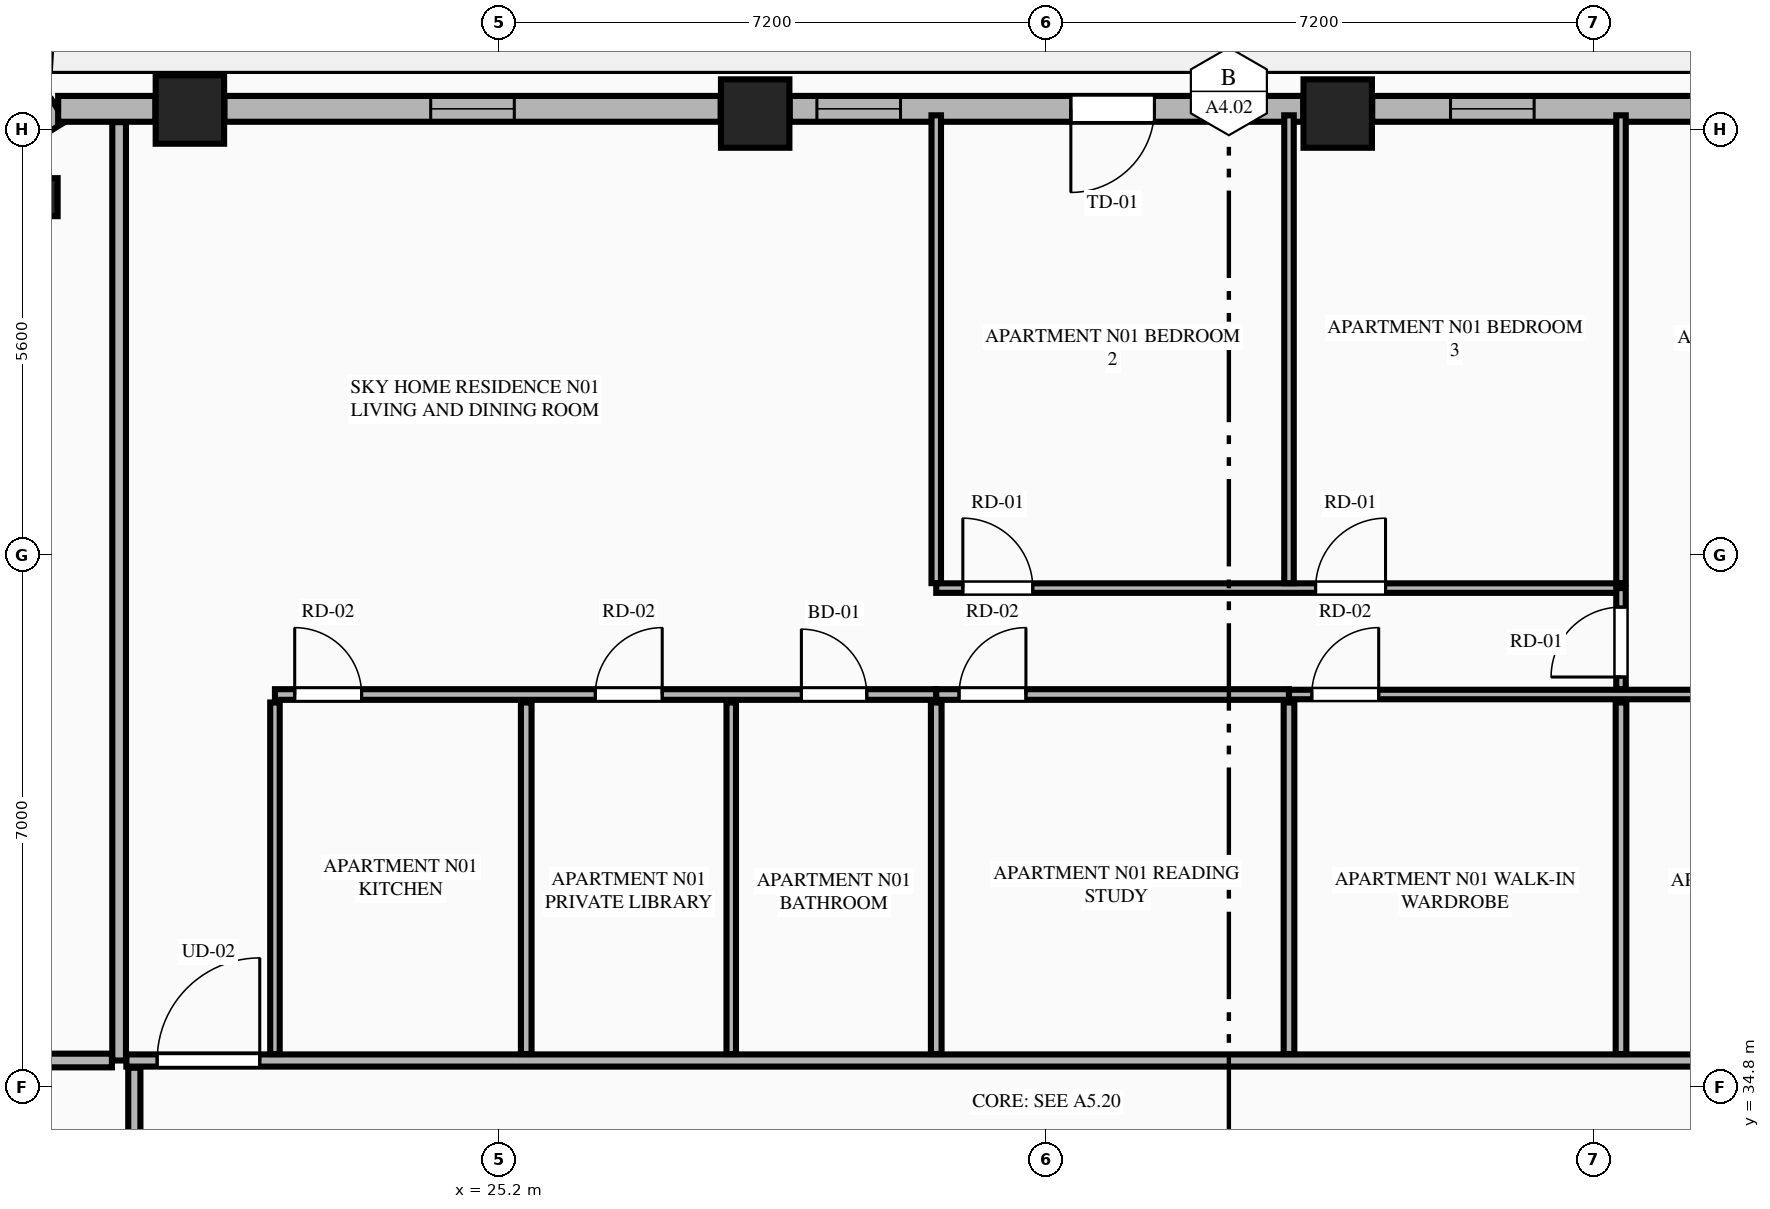
"""IFC4 building model, lengths in metres.
Left out: names, types, materials, properties, quantities, classifications, styles, units other than length and angle.
Written with IfcOpenShell. Run it as: python <this file> out.ifc"""

import sys

from ifc_helpers import new_model, si_unit, direction, frame, frame_2d, origin, origin_2d, place, context, subcontext, project, spatial, rectangle, extrude, element, fill, save


model = new_model("IFC4")
c1 = context("Model", 3, precision=1e-05, world=origin(), true_north=direction((0.0, 1.0)))
c2 = subcontext(c1, "Body", "Model", "MODEL_VIEW")
j1 = project(units=[si_unit("LENGTHUNIT", "METRE"), si_unit("PLANEANGLEUNIT", "RADIAN")], contexts=[c1])
p1 = place(None, origin())
s1 = spatial("IfcSite", under=j1, at=p1, CompositionType="ELEMENT")
p2 = place(p1, origin())
s2 = spatial("IfcBuilding", under=s1, at=p2, CompositionType="ELEMENT")
p3 = place(p2, frame((0.0, 0.0, 157.05)))
s3 = spatial("IfcBuildingStorey", under=s2, at=p3, CompositionType="ELEMENT", Elevation=157.05)
for number, where, z_axis, x_axis in (
    (1, (36.232, 47.608, 0.0), (0.0, 0.0, 1.0), (1.0, 0.0, 0.0)),
    (2, (28.568, 47.608, 0.0), (0.0, 0.0, 1.0), (1.0, 0.0, 0.0)),
    (3, (21.131, 47.661, 0.0), (0.0, 0.0, 1.0), (1.0, 0.0, 0.0)),
):
    element("IfcColumn", number, at=place(p3, frame(where, z_axis=z_axis, x_axis=x_axis)), inside=s3, PredefinedType="COLUMN", context=c2, shape_type="SweptSolid", body=[
        extrude(rectangle(XDim=0.9, YDim=0.9, at=origin_2d()), origin(), (0.0, 0.0, 1.0), 3.55),
    ])
p4 = place(p3, frame((19.141, 46.508, 0.0), z_axis=(0.0, 0.0, 1.0), x_axis=(-0.865160173452, -0.501495637342, 0.0)))
e4 = element("IfcColumn", 4, at=p4, inside=s3, PredefinedType="PILASTER", context=c2, shape_type="SweptSolid", body=[
    extrude(rectangle(XDim=0.5, YDim=0.35, at=origin_2d()), origin(), (0.0, 0.0, 1.0), 3.55),
])
p5 = place(p3, frame((19.403, 47.645, 0.0), z_axis=(0.0, 0.0, 1.0), x_axis=(-0.851798915137, -0.523868884523, 0.0)))
e5 = element("IfcWall", 5, at=p5, inside=s3, PredefinedType="STANDARD", context=c2, shape_type="SweptSolid", body=[
    extrude(rectangle(XDim=1.848, YDim=0.34, at=frame_2d((0.924, 0.0))), origin(), (0.0, 0.0, 1.0), 3.34),
])
p6 = place(p3, frame((43.215, 47.67, 0.0), z_axis=(0.0, 0.0, 1.0), x_axis=(-1.0, 0.0, 0.0)))
e6 = element("IfcWall", 6, at=p6, inside=s3, PredefinedType="STANDARD", context=c2, shape_type="SweptSolid", body=[
    extrude(rectangle(XDim=6.529, YDim=0.34, at=frame_2d((3.265, 0.0))), origin(), (0.0, 0.0, 1.0), 2.797),
])
p7 = place(p6, frame((1.022, 0.0, 0.75)))
e7 = element("IfcOpeningElement", 7, at=p7, cuts=e6, PredefinedType="OPENING", context=c2, shape_type="SweptSolid", body=[
    extrude(rectangle(XDim=1.1, YDim=1.897, at=frame_2d((0.55, 0.948))), frame((0.0, 0.18, 0.0), z_axis=(0.0, -1.0, 0.0), x_axis=(1.0, 0.0, 0.0)), (0.0, 0.0, 1.0), 0.36),
])
p8 = place(p6, frame((4.399, 0.0, 0.75)))
e8 = element("IfcOpeningElement", 8, at=p8, cuts=e6, PredefinedType="OPENING", context=c2, shape_type="SweptSolid", body=[
    extrude(rectangle(XDim=1.1, YDim=1.897, at=frame_2d((0.55, 0.948))), frame((0.0, 0.18, 0.0), z_axis=(0.0, -1.0, 0.0), x_axis=(1.0, 0.0, 0.0)), (0.0, 0.0, 1.0), 0.36),
])
p9 = place(p3, frame((35.778, 47.67, 0.0), z_axis=(0.0, 0.0, 1.0), x_axis=(-1.0, 0.0, 0.0)))
e9 = element("IfcWall", 9, at=p9, inside=s3, PredefinedType="STANDARD", context=c2, shape_type="SweptSolid", body=[
    extrude(rectangle(XDim=6.756, YDim=0.34, at=frame_2d((3.378, 0.0))), origin(), (0.0, 0.0, 1.0), 2.797),
])
p10 = place(p9, frame((1.957, 0.0, 0.0)))
e10 = element("IfcOpeningElement", 10, at=p10, cuts=e9, PredefinedType="OPENING", context=c2, shape_type="SweptSolid", body=[
    extrude(rectangle(XDim=1.1, YDim=2.25, at=frame_2d((0.55, 1.125))), frame((0.0, 0.18, 0.0), z_axis=(0.0, -1.0, 0.0), x_axis=(1.0, 0.0, 0.0)), (0.0, 0.0, 1.0), 0.36),
])
p11 = place(p9, frame((5.298, 0.0, 0.75)))
e11 = element("IfcOpeningElement", 11, at=p11, cuts=e9, PredefinedType="OPENING", context=c2, shape_type="SweptSolid", body=[
    extrude(rectangle(XDim=1.1, YDim=1.897, at=frame_2d((0.55, 0.948))), frame((0.0, 0.18, 0.0), z_axis=(0.0, -1.0, 0.0), x_axis=(1.0, 0.0, 0.0)), (0.0, 0.0, 1.0), 0.36),
])
p12 = place(p3, frame((28.114, 47.67, 0.0), z_axis=(0.0, 0.0, 1.0), x_axis=(-1.0, 0.0, 0.0)))
e12 = element("IfcWall", 12, at=p12, inside=s3, PredefinedType="STANDARD", context=c2, shape_type="SweptSolid", body=[
    extrude(rectangle(XDim=6.529, YDim=0.34, at=frame_2d((3.265, 0.0))), origin(), (0.0, 0.0, 1.0), 2.797),
])
p13 = place(p12, frame((2.715, 0.0, 0.75)))
e13 = element("IfcOpeningElement", 13, at=p13, cuts=e12, PredefinedType="OPENING", context=c2, shape_type="SweptSolid", body=[
    extrude(rectangle(XDim=1.1, YDim=1.897, at=frame_2d((0.55, 0.948))), frame((0.0, 0.18, 0.0), z_axis=(0.0, -1.0, 0.0), x_axis=(1.0, 0.0, 0.0)), (0.0, 0.0, 1.0), 0.36),
])
p14 = place(p3, frame((20.677, 47.67, 0.0), z_axis=(0.0, 0.0, 1.0), x_axis=(-1.0, 0.0, 0.0)))
e14 = element("IfcWall", 14, at=p14, inside=s3, PredefinedType="STANDARD", context=c2, shape_type="SweptSolid", body=[
    extrude(rectangle(XDim=1.279, YDim=0.34, at=frame_2d((0.64, 0.0))), origin(), (0.0, 0.0, 1.0), 3.34),
])
p15 = place(p3, frame((20.2, 35.15, 0.0), z_axis=(0.0, 0.0, 1.0), x_axis=(0.0, 1.0, 0.0)))
e15 = element("IfcWall", 15, at=p15, inside=s3, PredefinedType="PARTITIONING", context=c2, shape_type="SweptSolid", body=[
    extrude(rectangle(XDim=12.345, YDim=0.18, at=frame_2d((6.173, 0.0))), origin(), (0.0, 0.0, 1.0), 3.34),
])
p16 = place(p3, frame((20.295, 35.15, 0.0), z_axis=(0.0, 0.0, 1.0), x_axis=(1.0, 0.0, 0.0)))
e16 = element("IfcWall", 16, at=p16, inside=s3, PredefinedType="PARTITIONING", context=c2, shape_type="SweptSolid", body=[
    extrude(rectangle(XDim=24.21, YDim=0.16, at=frame_2d((12.105, 0.0))), origin(), (0.0, 0.0, 1.0), 3.34),
])
p17 = place(p16, frame((0.405, 0.0, 0.0)))
e17 = element("IfcOpeningElement", 17, at=p17, cuts=e16, PredefinedType="OPENING", context=c2, shape_type="SweptSolid", body=[
    extrude(rectangle(XDim=1.35, YDim=2.35, at=frame_2d((0.675, 1.175))), frame((0.0, 0.09, 0.0), z_axis=(0.0, -1.0, 0.0), x_axis=(1.0, 0.0, 0.0)), (0.0, 0.0, 1.0), 0.18),
])
p18 = place(p3, frame((22.25, 35.235, 0.0), z_axis=(0.0, 0.0, 1.0), x_axis=(0.0, 1.0, 0.0)))
e18 = element("IfcWall", 18, at=p18, inside=s3, PredefinedType="PARTITIONING", context=c2, shape_type="SweptSolid", body=[
    extrude(rectangle(XDim=4.625, YDim=0.125, at=frame_2d((2.312, 0.0))), origin(), (0.0, 0.0, 1.0), 2.722),
])
p19 = place(p3, frame((22.25, 39.965, 0.0), z_axis=(0.0, 0.0, 1.0), x_axis=(1.0, 0.0, 0.0)))
e19 = element("IfcWall", 19, at=p19, inside=s3, PredefinedType="PLUMBINGWALL", context=c2, shape_type="SweptSolid", body=[
    extrude(rectangle(XDim=8.7, YDim=0.14, at=frame_2d((4.35, 0.0))), origin(), (0.0, 0.0, 1.0), 3.34),
])
p20 = place(p19, frame((6.926, 0.0, 0.0)))
e20 = element("IfcOpeningElement", 20, at=p20, cuts=e19, PredefinedType="OPENING", context=c2, shape_type="SweptSolid", body=[
    extrude(rectangle(XDim=0.86, YDim=2.1, at=frame_2d((0.43, 1.05))), frame((0.0, 0.08, 0.0), z_axis=(0.0, -1.0, 0.0), x_axis=(1.0, 0.0, 0.0)), (0.0, 0.0, 1.0), 0.16),
])
p21 = place(p19, frame((0.26, 0.0, 0.0)))
e21 = element("IfcOpeningElement", 21, at=p21, cuts=e19, PredefinedType="OPENING", context=c2, shape_type="SweptSolid", body=[
    extrude(rectangle(XDim=0.88, YDim=2.15, at=frame_2d((0.44, 1.075))), frame((0.0, 0.08, 0.0), z_axis=(0.0, -1.0, 0.0), x_axis=(1.0, 0.0, 0.0)), (0.0, 0.0, 1.0), 0.16),
])
p22 = place(p19, frame((4.215, 0.0, 0.0)))
e22 = element("IfcOpeningElement", 22, at=p22, cuts=e19, PredefinedType="OPENING", context=c2, shape_type="SweptSolid", body=[
    extrude(rectangle(XDim=0.88, YDim=2.15, at=frame_2d((0.44, 1.075))), frame((0.0, 0.08, 0.0), z_axis=(0.0, -1.0, 0.0), x_axis=(1.0, 0.0, 0.0)), (0.0, 0.0, 1.0), 0.16),
])
p23 = place(p3, frame((30.95, 39.965, 0.0), z_axis=(0.0, 0.0, 1.0), x_axis=(1.0, 0.0, 0.0)))
e23 = element("IfcWall", 23, at=p23, inside=s3, PredefinedType="PLUMBINGWALL", context=c2, shape_type="SweptSolid", body=[
    extrude(rectangle(XDim=4.641, YDim=0.14, at=frame_2d((2.321, 0.0))), origin(), (0.0, 0.0, 1.0), 3.34),
])
p24 = place(p23, frame((0.3, 0.0, 0.0)))
e24 = element("IfcOpeningElement", 24, at=p24, cuts=e23, PredefinedType="OPENING", context=c2, shape_type="SweptSolid", body=[
    extrude(rectangle(XDim=0.88, YDim=2.15, at=frame_2d((0.44, 1.075))), frame((0.0, 0.08, 0.0), z_axis=(0.0, -1.0, 0.0), x_axis=(1.0, 0.0, 0.0)), (0.0, 0.0, 1.0), 0.16),
])
p25 = place(p3, frame((35.591, 39.965, 0.0), z_axis=(0.0, 0.0, 1.0), x_axis=(1.0, 0.0, 0.0)))
e25 = element("IfcWall", 25, at=p25, inside=s3, PredefinedType="PARTITIONING", context=c2, shape_type="SweptSolid", body=[
    extrude(rectangle(XDim=8.914, YDim=0.125, at=frame_2d((4.457, 0.0))), origin(), (0.0, 0.0, 1.0), 3.34),
])
p26 = place(p25, frame((6.216, 0.0, 0.0)))
e26 = element("IfcOpeningElement", 26, at=p26, cuts=e25, PredefinedType="OPENING", context=c2, shape_type="SweptSolid", body=[
    extrude(rectangle(XDim=0.86, YDim=2.1, at=frame_2d((0.43, 1.05))), frame((0.0, 0.073, 0.0), z_axis=(0.0, -1.0, 0.0), x_axis=(1.0, 0.0, 0.0)), (0.0, 0.0, 1.0), 0.145),
])
p27 = place(p25, frame((0.3, 0.0, 0.0)))
e27 = element("IfcOpeningElement", 27, at=p27, cuts=e25, PredefinedType="OPENING", context=c2, shape_type="SweptSolid", body=[
    extrude(rectangle(XDim=0.88, YDim=2.15, at=frame_2d((0.44, 1.075))), frame((0.0, 0.073, 0.0), z_axis=(0.0, -1.0, 0.0), x_axis=(1.0, 0.0, 0.0)), (0.0, 0.0, 1.0), 0.145),
])
p28 = place(p3, frame((25.556, 35.235, 0.0), z_axis=(0.0, 0.0, 1.0), x_axis=(0.0, 1.0, 0.0)))
e28 = element("IfcWall", 28, at=p28, inside=s3, PredefinedType="PLUMBINGWALL", context=c2, shape_type="SweptSolid", body=[
    extrude(rectangle(XDim=4.625, YDim=0.14, at=frame_2d((2.312, 0.0))), origin(), (0.0, 0.0, 1.0), 3.34),
])
p29 = place(p3, frame((28.253, 35.235, 0.0), z_axis=(0.0, 0.0, 1.0), x_axis=(0.0, 1.0, 0.0)))
e29 = element("IfcWall", 29, at=p29, inside=s3, PredefinedType="PARTITIONING", context=c2, shape_type="SweptSolid", body=[
    extrude(rectangle(XDim=4.625, YDim=0.125, at=frame_2d((2.312, 0.0))), origin(), (0.0, 0.0, 1.0), 3.34),
])
p30 = place(p3, frame((30.95, 41.43, 0.0), z_axis=(0.0, 0.0, 1.0), x_axis=(0.0, 1.0, 0.0)))
e30 = element("IfcWall", 30, at=p30, inside=s3, PredefinedType="PARTITIONING", context=c2, shape_type="SweptSolid", body=[
    extrude(rectangle(XDim=6.155, YDim=0.125, at=frame_2d((3.078, 0.0))), origin(), (0.0, 0.0, 1.0), 3.34),
])
p31 = place(p3, frame((30.95, 41.365, 0.0), z_axis=(0.0, 0.0, 1.0), x_axis=(1.0, 0.0, 0.0)))
e31 = element("IfcWall", 31, at=p31, inside=s3, PredefinedType="PARTITIONING", context=c2, shape_type="SweptSolid", body=[
    extrude(rectangle(XDim=9.009, YDim=0.125, at=frame_2d((4.504, 0.0))), origin(), (0.0, 0.0, 1.0), 3.34),
])
p32 = place(p31, frame((0.35, 0.0, 0.0)))
e32 = element("IfcOpeningElement", 32, at=p32, cuts=e31, PredefinedType="OPENING", context=c2, shape_type="SweptSolid", body=[
    extrude(rectangle(XDim=0.92, YDim=2.15, at=frame_2d((0.46, 1.075))), frame((0.0, 0.073, 0.0), z_axis=(0.0, -1.0, 0.0), x_axis=(1.0, 0.0, 0.0)), (0.0, 0.0, 1.0), 0.145),
])
p33 = place(p31, frame((4.991, 0.0, 0.0)))
e33 = element("IfcOpeningElement", 33, at=p33, cuts=e31, PredefinedType="OPENING", context=c2, shape_type="SweptSolid", body=[
    extrude(rectangle(XDim=0.92, YDim=2.15, at=frame_2d((0.46, 1.075))), frame((0.0, 0.073, 0.0), z_axis=(0.0, -1.0, 0.0), x_axis=(1.0, 0.0, 0.0)), (0.0, 0.0, 1.0), 0.145),
])
p34 = place(p3, frame((39.959, 40.035, 0.0), z_axis=(0.0, 0.0, 1.0), x_axis=(0.0, 1.0, 0.0)))
e34 = element("IfcWall", 34, at=p34, inside=s3, PredefinedType="PARTITIONING", context=c2, shape_type="SweptSolid", body=[
    extrude(rectangle(XDim=1.33, YDim=0.125, at=frame_2d((0.665, 0.0))), origin(), (0.0, 0.0, 1.0), 3.34),
])
p35 = place(p34, frame((0.16, 0.0, 0.0)))
e35 = element("IfcOpeningElement", 35, at=p35, cuts=e34, PredefinedType="OPENING", context=c2, shape_type="SweptSolid", body=[
    extrude(rectangle(XDim=0.92, YDim=2.15, at=frame_2d((0.46, 1.075))), frame((0.0, 0.073, 0.0), z_axis=(0.0, -1.0, 0.0), x_axis=(1.0, 0.0, 0.0)), (0.0, 0.0, 1.0), 0.145),
])
for number, where, z_axis, x_axis in (
    (36, (30.95, 35.235, 0.0), (0.0, 0.0, 1.0), (0.0, 1.0, 0.0)),
    (37, (35.591, 35.235, 0.0), (0.0, 0.0, 1.0), (0.0, 1.0, 0.0)),
):
    element("IfcWall", number, at=place(p3, frame(where, z_axis=z_axis, x_axis=x_axis)), inside=s3, PredefinedType="PLUMBINGWALL", context=c2, shape_type="SweptSolid", body=[
        extrude(rectangle(XDim=4.625, YDim=0.14, at=frame_2d((2.312, 0.0))), origin(), (0.0, 0.0, 1.0), 3.34),
    ])
for number, where, z_axis, x_axis in (
    (38, (35.591, 41.43, 0.0), (0.0, 0.0, 1.0), (0.0, 1.0, 0.0)),
    (39, (39.959, 41.43, 0.0), (0.0, 0.0, 1.0), (0.0, 1.0, 0.0)),
):
    element("IfcWall", number, at=place(p3, frame(where, z_axis=z_axis, x_axis=x_axis)), inside=s3, PredefinedType="PARTITIONING", context=c2, shape_type="SweptSolid", body=[
        extrude(rectangle(XDim=6.155, YDim=0.125, at=frame_2d((3.078, 0.0))), origin(), (0.0, 0.0, 1.0), 3.34),
    ])
p36 = place(p3, frame((39.959, 35.235, 0.0), z_axis=(0.0, 0.0, 1.0), x_axis=(0.0, 1.0, 0.0)))
e40 = element("IfcWall", 40, at=p36, inside=s3, PredefinedType="PLUMBINGWALL", context=c2, shape_type="SweptSolid", body=[
    extrude(rectangle(XDim=4.625, YDim=0.14, at=frame_2d((2.312, 0.0))), origin(), (0.0, 0.0, 1.0), 3.34),
])
p37 = place(p3, frame((12.21, 35.15, 0.0), z_axis=(0.0, 0.0, 1.0), x_axis=(1.0, 0.0, 0.0)))
e41 = element("IfcWall", 41, at=p37, inside=s3, PredefinedType="PARTITIONING", context=c2, shape_type="SweptSolid", body=[
    extrude(rectangle(XDim=7.895, YDim=0.18, at=frame_2d((3.948, 0.0))), origin(), (0.0, 0.0, 1.0), 3.34),
])
p38 = place(p3, frame((20.4, 16.745, 0.0), z_axis=(0.0, 0.0, 1.0), x_axis=(0.0, 1.0, 0.0)))
e42 = element("IfcWall", 42, at=p38, inside=s3, PredefinedType="PARTITIONING", context=c2, shape_type="SweptSolid", body=[
    extrude(rectangle(XDim=18.31, YDim=0.16, at=frame_2d((9.155, 0.0))), origin(), (0.0, 0.0, 1.0), 3.34),
])
p39 = place(p38, frame((0.45, 0.0, 0.0)))
e43 = element("IfcOpeningElement", 43, at=p39, cuts=e42, PredefinedType="OPENING", context=c2, shape_type="SweptSolid", body=[
    extrude(rectangle(XDim=1.02, YDim=2.25, at=frame_2d((0.51, 1.125))), frame((0.0, 0.09, 0.0), z_axis=(0.0, -1.0, 0.0), x_axis=(1.0, 0.0, 0.0)), (0.0, 0.0, 1.0), 0.18),
])
p40 = place(p10, origin())
e44 = element("IfcDoor", 44, at=p40, inside=s3, OperationType="SINGLE_SWING_RIGHT", PredefinedType="DOOR", context=c2, shape_type="SweptSolid", body=[
    extrude(rectangle(XDim=1.1, YDim=2.25, at=frame_2d((0.55, 1.125))), frame((0.0, 0.025, 0.0), z_axis=(0.0, -1.0, 0.0), x_axis=(1.0, 0.0, 0.0)), (0.0, 0.0, 1.0), 0.05),
])
fill(e10, e44)
p41 = place(p13, origin())
e45 = element("IfcWindow", 45, at=p41, inside=s3, PartitioningType="SINGLE_PANEL", PredefinedType="WINDOW", context=c2, shape_type="SweptSolid", body=[
    extrude(rectangle(XDim=1.1, YDim=1.897, at=frame_2d((0.55, 0.948))), frame((0.0, 0.03, 0.0), z_axis=(0.0, -1.0, 0.0), x_axis=(1.0, 0.0, 0.0)), (0.0, 0.0, 1.0), 0.06),
])
fill(e13, e45)
p42 = place(p20, origin())
e46 = element("IfcDoor", 46, at=p42, inside=s3, OperationType="SINGLE_SWING_LEFT", PredefinedType="DOOR", context=c2, shape_type="SweptSolid", body=[
    extrude(rectangle(XDim=0.86, YDim=2.1, at=frame_2d((0.43, 1.05))), frame((0.0, 0.025, 0.0), z_axis=(0.0, -1.0, 0.0), x_axis=(1.0, 0.0, 0.0)), (0.0, 0.0, 1.0), 0.05),
])
fill(e20, e46)
p43 = place(p17, origin())
e47 = element("IfcDoor", 47, at=p43, inside=s3, OperationType="SINGLE_SWING_RIGHT", PredefinedType="DOOR", context=c2, shape_type="SweptSolid", body=[
    extrude(rectangle(XDim=1.35, YDim=2.35, at=frame_2d((0.675, 1.175))), frame((0.0, 0.025, 0.0), z_axis=(0.0, -1.0, 0.0), x_axis=(1.0, 0.0, 0.0)), (0.0, 0.0, 1.0), 0.05),
])
fill(e17, e47)
p44 = place(p21, origin())
e48 = element("IfcDoor", 48, at=p44, inside=s3, OperationType="SINGLE_SWING_LEFT", PredefinedType="DOOR", context=c2, shape_type="SweptSolid", body=[
    extrude(rectangle(XDim=0.88, YDim=2.15, at=frame_2d((0.44, 1.075))), frame((0.0, 0.025, 0.0), z_axis=(0.0, -1.0, 0.0), x_axis=(1.0, 0.0, 0.0)), (0.0, 0.0, 1.0), 0.05),
])
fill(e21, e48)
p45 = place(p22, origin())
e49 = element("IfcDoor", 49, at=p45, inside=s3, OperationType="SINGLE_SWING_RIGHT", PredefinedType="DOOR", context=c2, shape_type="SweptSolid", body=[
    extrude(rectangle(XDim=0.88, YDim=2.15, at=frame_2d((0.44, 1.075))), frame((0.0, 0.025, 0.0), z_axis=(0.0, -1.0, 0.0), x_axis=(1.0, 0.0, 0.0)), (0.0, 0.0, 1.0), 0.05),
])
fill(e22, e49)
p46 = place(p24, origin())
e50 = element("IfcDoor", 50, at=p46, inside=s3, OperationType="SINGLE_SWING_RIGHT", PredefinedType="DOOR", context=c2, shape_type="SweptSolid", body=[
    extrude(rectangle(XDim=0.88, YDim=2.15, at=frame_2d((0.44, 1.075))), frame((0.0, 0.025, 0.0), z_axis=(0.0, -1.0, 0.0), x_axis=(1.0, 0.0, 0.0)), (0.0, 0.0, 1.0), 0.05),
])
fill(e24, e50)
p47 = place(p32, origin())
e51 = element("IfcDoor", 51, at=p47, inside=s3, OperationType="SINGLE_SWING_LEFT", PredefinedType="DOOR", context=c2, shape_type="SweptSolid", body=[
    extrude(rectangle(XDim=0.92, YDim=2.15, at=frame_2d((0.46, 1.075))), frame((0.0, 0.025, 0.0), z_axis=(0.0, -1.0, 0.0), x_axis=(1.0, 0.0, 0.0)), (0.0, 0.0, 1.0), 0.05),
])
fill(e32, e51)
p48 = place(p33, origin())
e52 = element("IfcDoor", 52, at=p48, inside=s3, OperationType="SINGLE_SWING_RIGHT", PredefinedType="DOOR", context=c2, shape_type="SweptSolid", body=[
    extrude(rectangle(XDim=0.92, YDim=2.15, at=frame_2d((0.46, 1.075))), frame((0.0, 0.025, 0.0), z_axis=(0.0, -1.0, 0.0), x_axis=(1.0, 0.0, 0.0)), (0.0, 0.0, 1.0), 0.05),
])
fill(e33, e52)
p49 = place(p35, origin())
e53 = element("IfcDoor", 53, at=p49, inside=s3, OperationType="SINGLE_SWING_LEFT", PredefinedType="DOOR", context=c2, shape_type="SweptSolid", body=[
    extrude(rectangle(XDim=0.92, YDim=2.15, at=frame_2d((0.46, 1.075))), frame((0.0, 0.025, 0.0), z_axis=(0.0, -1.0, 0.0), x_axis=(1.0, 0.0, 0.0)), (0.0, 0.0, 1.0), 0.05),
])
fill(e35, e53)
p50 = place(p27, origin())
e54 = element("IfcDoor", 54, at=p50, inside=s3, OperationType="SINGLE_SWING_RIGHT", PredefinedType="DOOR", context=c2, shape_type="SweptSolid", body=[
    extrude(rectangle(XDim=0.88, YDim=2.15, at=frame_2d((0.44, 1.075))), frame((0.0, 0.025, 0.0), z_axis=(0.0, -1.0, 0.0), x_axis=(1.0, 0.0, 0.0)), (0.0, 0.0, 1.0), 0.05),
])
fill(e27, e54)
p51 = place(p8, origin())
e55 = element("IfcWindow", 55, at=p51, inside=s3, PartitioningType="SINGLE_PANEL", PredefinedType="WINDOW", context=c2, shape_type="SweptSolid", body=[
    extrude(rectangle(XDim=1.1, YDim=1.897, at=frame_2d((0.55, 0.948))), frame((0.0, 0.03, 0.0), z_axis=(0.0, -1.0, 0.0), x_axis=(1.0, 0.0, 0.0)), (0.0, 0.0, 1.0), 0.06),
])
fill(e8, e55)
p52 = place(p11, origin())
e56 = element("IfcWindow", 56, at=p52, inside=s3, PartitioningType="SINGLE_PANEL", PredefinedType="WINDOW", context=c2, shape_type="SweptSolid", body=[
    extrude(rectangle(XDim=1.1, YDim=1.897, at=frame_2d((0.55, 0.948))), frame((0.0, 0.03, 0.0), z_axis=(0.0, -1.0, 0.0), x_axis=(1.0, 0.0, 0.0)), (0.0, 0.0, 1.0), 0.06),
])
fill(e11, e56)
save(model, sys.argv[1])
